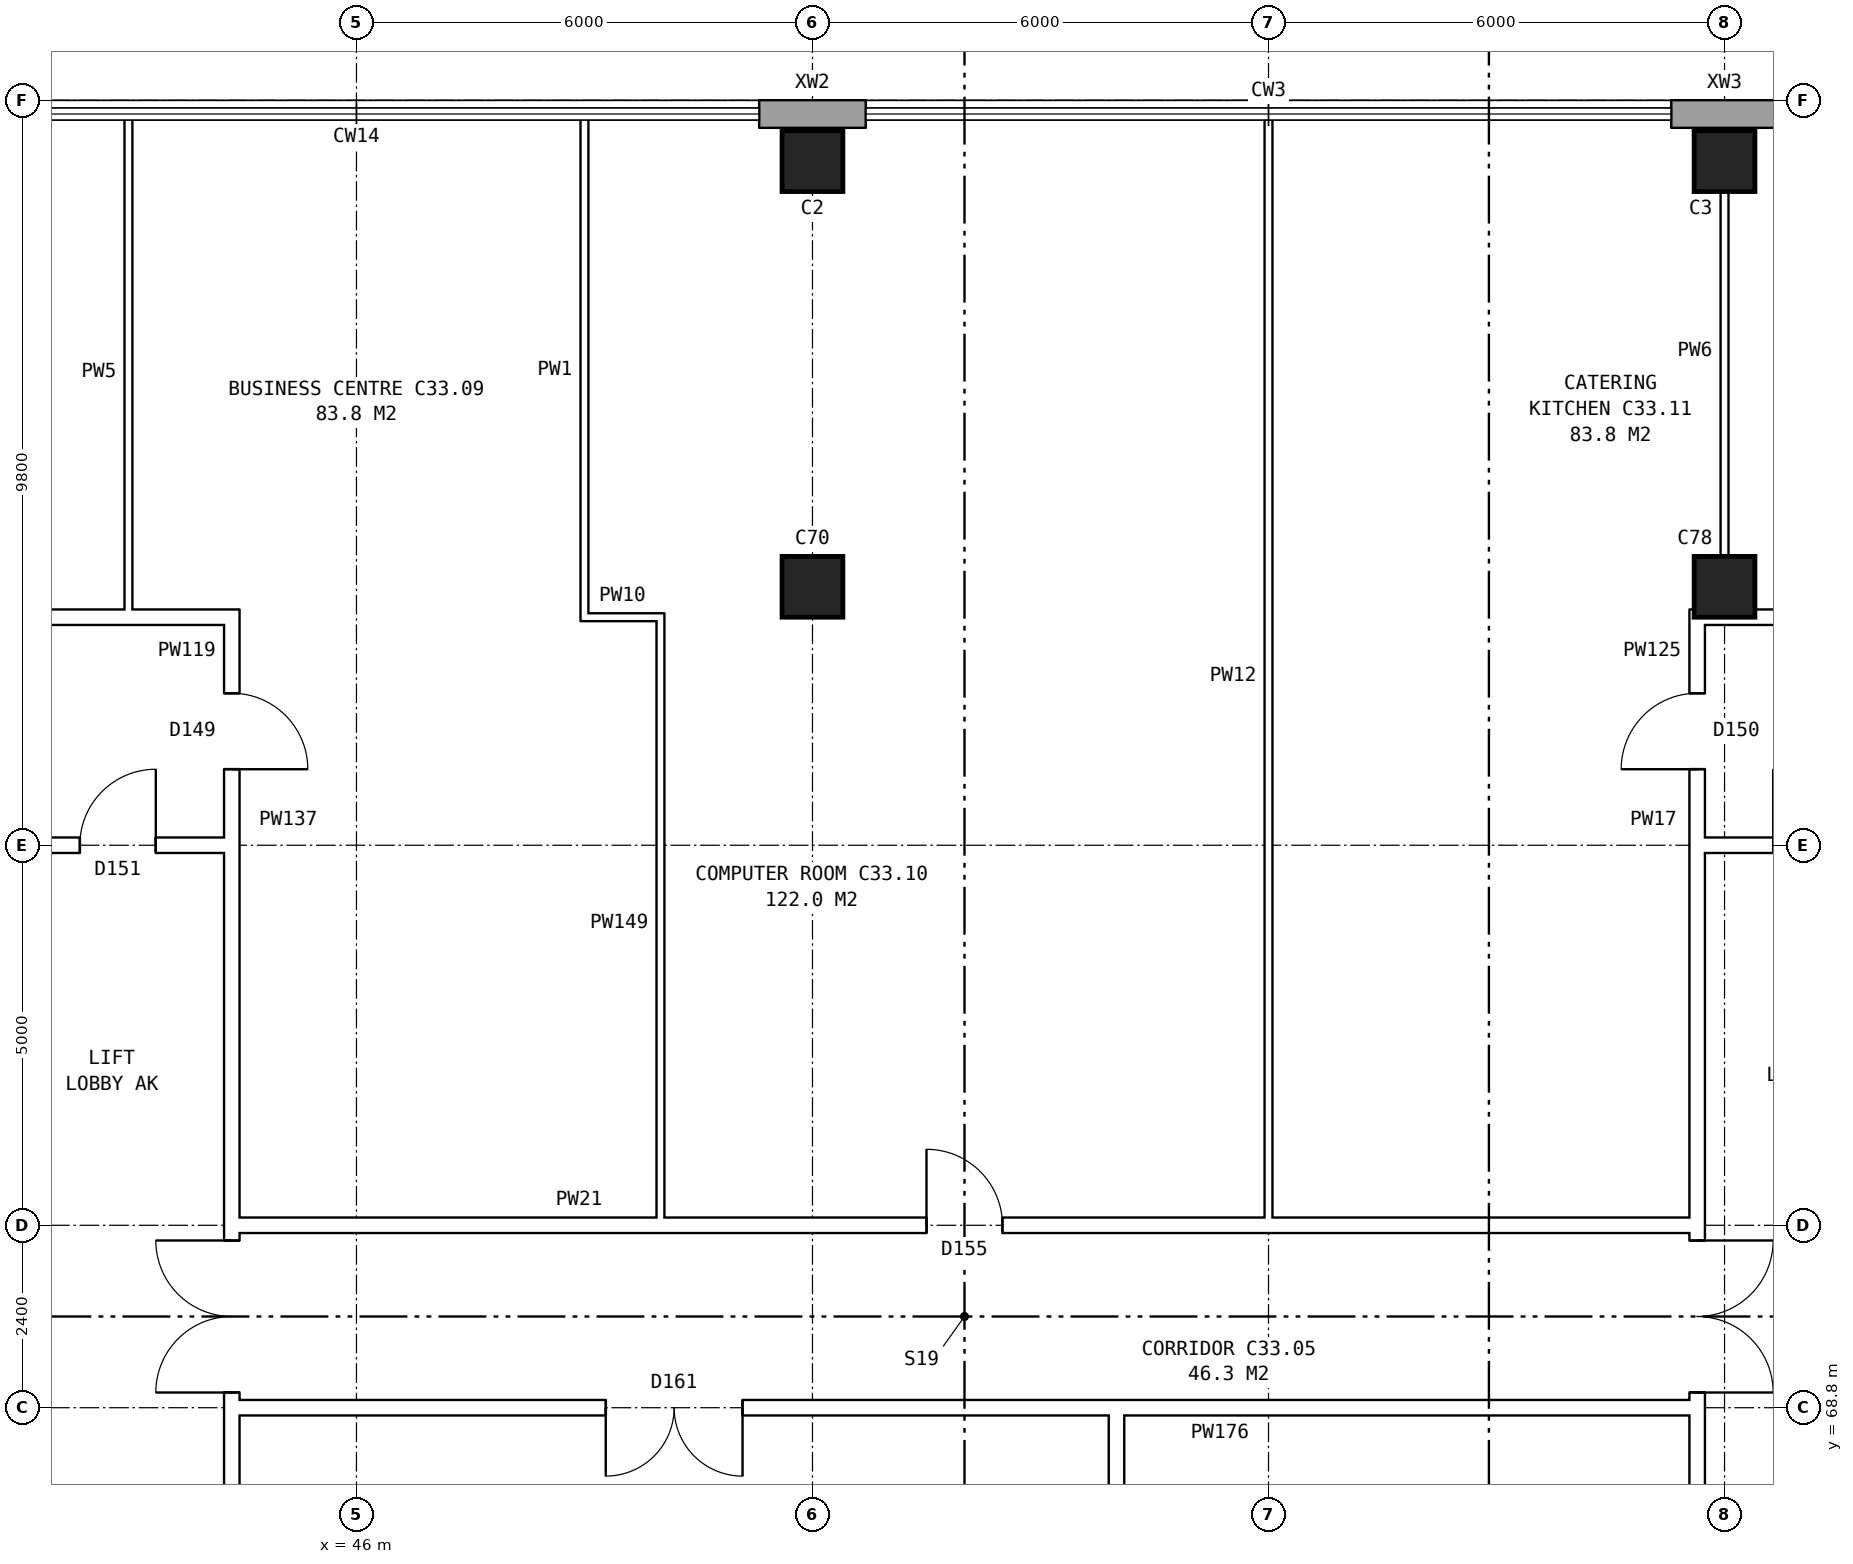
"""IFC4 building model, lengths in metres.
Left out: names, types, materials, properties, quantities, classifications, styles, units other than length and angle.
Written with IfcOpenShell. Run it as: python <this file> out.ifc"""

import sys

from ifc_helpers import new_model, si_unit, direction, frame, frame_2d, origin, origin_2d, place, context, subcontext, project, spatial, rectangle, extrude, element, fill, save


model = new_model("IFC4")
c1 = context("Model", 3, precision=1e-05, world=origin(), true_north=direction((0.0, 1.0)))
c2 = subcontext(c1, "Body", "Model", "MODEL_VIEW")
j1 = project(units=[si_unit("LENGTHUNIT", "METRE"), si_unit("PLANEANGLEUNIT", "RADIAN")], contexts=[c1])
p1 = place(None, origin())
s1 = spatial("IfcSite", under=j1, at=p1, CompositionType="ELEMENT")
p2 = place(p1, origin())
s2 = spatial("IfcBuilding", under=s1, at=p2, CompositionType="ELEMENT")
p3 = place(p2, frame((0.0, 0.0, 119.5)))
s3 = spatial("IfcBuildingStorey", under=s2, at=p3, CompositionType="ELEMENT", Elevation=119.5)
for number, where, z_axis, x_axis in (
    (1, (52.0, 79.6, 0.0), (0.0, 0.0, 1.0), (1.0, 0.0, 0.0)),
    (2, (52.0, 85.2, 0.0), (0.0, 0.0, 1.0), (1.0, 0.0, 0.0)),
    (3, (64.0, 79.6, 0.0), (0.0, 0.0, 1.0), (1.0, 0.0, 0.0)),
    (4, (64.0, 85.2, 0.0), (0.0, 0.0, 1.0), (1.0, 0.0, 0.0)),
):
    element("IfcColumn", number, at=place(p3, frame(where, z_axis=z_axis, x_axis=x_axis)), inside=s3, PredefinedType="COLUMN", context=c2, shape_type="SweptSolid", body=[
        extrude(rectangle(XDim=0.8, YDim=0.8, at=origin_2d()), origin(), (0.0, 0.0, 1.0), 3.6),
    ])
for number, where, z_axis, x_axis in (
    (5, (64.7, 85.82, 0.0), (0.0, 0.0, 1.0), (-1.0, 0.0, 0.0)),
    (6, (52.7, 85.82, 0.0), (0.0, 0.0, 1.0), (-1.0, 0.0, 0.0)),
):
    element("IfcWall", number, at=place(p3, frame(where, z_axis=z_axis, x_axis=x_axis)), inside=s3, PredefinedType="STANDARD", context=c2, shape_type="SweptSolid", body=[
        extrude(rectangle(XDim=1.4, YDim=0.36, at=frame_2d((0.7, 0.0))), origin(), (0.0, 0.0, 1.0), 3.6),
    ])
p4 = place(p3, frame((63.64, 63.9, 0.0), z_axis=(0.0, 0.0, 1.0), x_axis=(0.0, 1.0, 0.0)))
e7 = element("IfcWall", 7, at=p4, inside=s3, PredefinedType="PARTITIONING", context=c2, shape_type="SweptSolid", body=[
    extrude(rectangle(XDim=12.2, YDim=0.2, at=frame_2d((6.1, 0.0))), origin(), (0.0, 0.0, 1.0), 3.6),
])
p5 = place(p4, frame((5.1, 0.0, 0.0)))
e8 = element("IfcOpeningElement", 8, at=p5, cuts=e7, PredefinedType="OPENING", context=c2, shape_type="SweptSolid", body=[
    extrude(rectangle(XDim=2.0, YDim=2.1, at=frame_2d((1.0, 1.05))), frame((0.0, 0.11, 0.0), z_axis=(0.0, -1.0, 0.0), x_axis=(1.0, 0.0, 0.0)), (0.0, 0.0, 1.0), 0.22),
])
p6 = place(p3, frame((44.36, 63.9, 0.0), z_axis=(0.0, 0.0, 1.0), x_axis=(0.0, 1.0, 0.0)))
e9 = element("IfcWall", 9, at=p6, inside=s3, PredefinedType="PARTITIONING", context=c2, shape_type="SweptSolid", body=[
    extrude(rectangle(XDim=12.2, YDim=0.2, at=frame_2d((6.1, 0.0))), origin(), (0.0, 0.0, 1.0), 3.6),
])
p7 = place(p6, frame((5.1, 0.0, 0.0)))
e10 = element("IfcOpeningElement", 10, at=p7, cuts=e9, PredefinedType="OPENING", context=c2, shape_type="SweptSolid", body=[
    extrude(rectangle(XDim=2.0, YDim=2.1, at=frame_2d((1.0, 1.05))), frame((0.0, 0.11, 0.0), z_axis=(0.0, -1.0, 0.0), x_axis=(1.0, 0.0, 0.0)), (0.0, 0.0, 1.0), 0.22),
])
p8 = place(p3, frame((44.36, 68.8, 0.0), z_axis=(0.0, 0.0, 1.0), x_axis=(1.0, 0.0, 0.0)))
e11 = element("IfcWall", 11, at=p8, inside=s3, PredefinedType="PARTITIONING", context=c2, shape_type="SweptSolid", body=[
    extrude(rectangle(XDim=19.28, YDim=0.2, at=frame_2d((9.64, 0.0))), origin(), (0.0, 0.0, 1.0), 3.6),
])
p9 = place(p8, frame((4.92, 0.0, 0.0)))
e12 = element("IfcOpeningElement", 12, at=p9, cuts=e11, PredefinedType="OPENING", context=c2, shape_type="SweptSolid", body=[
    extrude(rectangle(XDim=1.8, YDim=2.1, at=frame_2d((0.9, 1.05))), frame((0.0, 0.11, 0.0), z_axis=(0.0, -1.0, 0.0), x_axis=(1.0, 0.0, 0.0)), (0.0, 0.0, 1.0), 0.22),
])
p10 = place(p3, frame((44.36, 71.2, 0.0), z_axis=(0.0, 0.0, 1.0), x_axis=(1.0, 0.0, 0.0)))
e13 = element("IfcWall", 13, at=p10, inside=s3, PredefinedType="PARTITIONING", context=c2, shape_type="SweptSolid", body=[
    extrude(rectangle(XDim=19.28, YDim=0.2, at=frame_2d((9.64, 0.0))), origin(), (0.0, 0.0, 1.0), 3.6),
])
p11 = place(p10, frame((9.14, 0.0, 0.0)))
e14 = element("IfcOpeningElement", 14, at=p11, cuts=e13, PredefinedType="OPENING", context=c2, shape_type="SweptSolid", body=[
    extrude(rectangle(XDim=1.0, YDim=2.1, at=frame_2d((0.5, 1.05))), frame((0.0, 0.11, 0.0), z_axis=(0.0, -1.0, 0.0), x_axis=(1.0, 0.0, 0.0)), (0.0, 0.0, 1.0), 0.22),
])
p12 = place(p3, frame((41.36, 76.2, 0.0), z_axis=(0.0, 0.0, 1.0), x_axis=(1.0, 0.0, 0.0)))
e15 = element("IfcWall", 15, at=p12, inside=s3, PredefinedType="PARTITIONING", context=c2, shape_type="SweptSolid", body=[
    extrude(rectangle(XDim=3.1, YDim=0.2, at=frame_2d((1.55, 0.0))), origin(), (0.0, 0.0, 1.0), 3.6),
])
p13 = place(p12, frame((1.0, 0.0, 0.0)))
e16 = element("IfcOpeningElement", 16, at=p13, cuts=e15, PredefinedType="OPENING", context=c2, shape_type="SweptSolid", body=[
    extrude(rectangle(XDim=1.0, YDim=2.1, at=frame_2d((0.5, 1.05))), frame((0.0, 0.11, 0.0), z_axis=(0.0, -1.0, 0.0), x_axis=(1.0, 0.0, 0.0)), (0.0, 0.0, 1.0), 0.22),
])
p14 = place(p3, frame((63.54, 76.2, 0.0), z_axis=(0.0, 0.0, 1.0), x_axis=(1.0, 0.0, 0.0)))
e17 = element("IfcWall", 17, at=p14, inside=s3, PredefinedType="PARTITIONING", context=c2, shape_type="SweptSolid", body=[
    extrude(rectangle(XDim=3.1, YDim=0.2, at=frame_2d((1.55, 0.0))), origin(), (0.0, 0.0, 1.0), 3.6),
])
p15 = place(p14, frame((1.1, 0.0, 0.0)))
e18 = element("IfcOpeningElement", 18, at=p15, cuts=e17, PredefinedType="OPENING", context=c2, shape_type="SweptSolid", body=[
    extrude(rectangle(XDim=1.0, YDim=2.1, at=frame_2d((0.5, 1.05))), frame((0.0, 0.11, 0.0), z_axis=(0.0, -1.0, 0.0), x_axis=(1.0, 0.0, 0.0)), (0.0, 0.0, 1.0), 0.22),
])
p16 = place(p3, frame((26.99, 79.2, 0.0), z_axis=(0.0, 0.0, 1.0), x_axis=(1.0, 0.0, 0.0)))
e19 = element("IfcWall", 19, at=p16, inside=s3, PredefinedType="PARTITIONING", context=c2, shape_type="SweptSolid", body=[
    extrude(rectangle(XDim=17.47, YDim=0.2, at=frame_2d((8.735, 0.0))), origin(), (0.0, 0.0, 1.0), 3.6),
])
p17 = place(p16, frame((1.615, 0.0, 0.0)))
e20 = element("IfcOpeningElement", 20, at=p17, cuts=e19, PredefinedType="OPENING", context=c2, shape_type="SweptSolid", body=[
    extrude(rectangle(XDim=0.9, YDim=2.1, at=frame_2d((0.45, 1.05))), frame((0.0, 0.11, 0.0), z_axis=(0.0, -1.0, 0.0), x_axis=(1.0, 0.0, 0.0)), (0.0, 0.0, 1.0), 0.22),
])
p18 = place(p16, frame((5.06, 0.0, 0.0)))
e21 = element("IfcOpeningElement", 21, at=p18, cuts=e19, PredefinedType="OPENING", context=c2, shape_type="SweptSolid", body=[
    extrude(rectangle(XDim=0.9, YDim=2.1, at=frame_2d((0.45, 1.05))), frame((0.0, 0.11, 0.0), z_axis=(0.0, -1.0, 0.0), x_axis=(1.0, 0.0, 0.0)), (0.0, 0.0, 1.0), 0.22),
])
p19 = place(p16, frame((8.06, 0.0, 0.0)))
e22 = element("IfcOpeningElement", 22, at=p19, cuts=e19, PredefinedType="OPENING", context=c2, shape_type="SweptSolid", body=[
    extrude(rectangle(XDim=0.9, YDim=2.1, at=frame_2d((0.45, 1.05))), frame((0.0, 0.11, 0.0), z_axis=(0.0, -1.0, 0.0), x_axis=(1.0, 0.0, 0.0)), (0.0, 0.0, 1.0), 0.22),
])
p20 = place(p16, frame((13.71, 0.0, 0.0)))
e23 = element("IfcOpeningElement", 23, at=p20, cuts=e19, PredefinedType="OPENING", context=c2, shape_type="SweptSolid", body=[
    extrude(rectangle(XDim=1.0, YDim=2.1, at=frame_2d((0.5, 1.05))), frame((0.0, 0.11, 0.0), z_axis=(0.0, -1.0, 0.0), x_axis=(1.0, 0.0, 0.0)), (0.0, 0.0, 1.0), 0.22),
])
p21 = place(p3, frame((63.54, 79.2, 0.0), z_axis=(0.0, 0.0, 1.0), x_axis=(1.0, 0.0, 0.0)))
e24 = element("IfcWall", 24, at=p21, inside=s3, PredefinedType="PARTITIONING", context=c2, shape_type="SweptSolid", body=[
    extrude(rectangle(XDim=12.22, YDim=0.2, at=frame_2d((6.11, 0.0))), origin(), (0.0, 0.0, 1.0), 3.6),
])
p22 = place(p21, frame((1.46, 0.0, 0.0)))
e25 = element("IfcOpeningElement", 25, at=p22, cuts=e24, PredefinedType="OPENING", context=c2, shape_type="SweptSolid", body=[
    extrude(rectangle(XDim=1.0, YDim=2.1, at=frame_2d((0.5, 1.05))), frame((0.0, 0.11, 0.0), z_axis=(0.0, -1.0, 0.0), x_axis=(1.0, 0.0, 0.0)), (0.0, 0.0, 1.0), 0.22),
])
p23 = place(p21, frame((5.96, 0.0, 0.0)))
e26 = element("IfcOpeningElement", 26, at=p23, cuts=e24, PredefinedType="OPENING", context=c2, shape_type="SweptSolid", body=[
    extrude(rectangle(XDim=1.0, YDim=2.1, at=frame_2d((0.5, 1.05))), frame((0.0, 0.11, 0.0), z_axis=(0.0, -1.0, 0.0), x_axis=(1.0, 0.0, 0.0)), (0.0, 0.0, 1.0), 0.22),
])
p24 = place(p21, frame((10.28, 0.0, 0.0)))
e27 = element("IfcOpeningElement", 27, at=p24, cuts=e24, PredefinedType="OPENING", context=c2, shape_type="SweptSolid", body=[
    extrude(rectangle(XDim=1.0, YDim=2.1, at=frame_2d((0.5, 1.05))), frame((0.0, 0.11, 0.0), z_axis=(0.0, -1.0, 0.0), x_axis=(1.0, 0.0, 0.0)), (0.0, 0.0, 1.0), 0.22),
])
p25 = place(p3, frame((48.95, 79.2, 0.0), z_axis=(0.0, 0.0, 1.0), x_axis=(1.0, 0.0, 0.0)))
e28 = element("IfcWall", 28, at=p25, inside=s3, PredefinedType="PARTITIONING", context=c2, shape_type="SweptSolid", body=[
    extrude(rectangle(XDim=1.1, YDim=0.1, at=frame_2d((0.55, 0.0))), origin(), (0.0, 0.0, 1.0), 3.6),
])
p26 = place(p3, frame((43.0, 79.1, 0.0), z_axis=(0.0, 0.0, 1.0), x_axis=(0.0, 1.0, 0.0)))
e29 = element("IfcWall", 29, at=p26, inside=s3, PredefinedType="PARTITIONING", context=c2, shape_type="SweptSolid", body=[
    extrude(rectangle(XDim=6.66, YDim=0.1, at=frame_2d((3.33, 0.0))), origin(), (0.0, 0.0, 1.0), 3.6),
])
p27 = place(p3, frame((44.36, 76.1, 0.0), z_axis=(0.0, 0.0, 1.0), x_axis=(0.0, 1.0, 0.0)))
e30 = element("IfcWall", 30, at=p27, inside=s3, PredefinedType="PARTITIONING", context=c2, shape_type="SweptSolid", body=[
    extrude(rectangle(XDim=3.2, YDim=0.2, at=frame_2d((1.6, 0.0))), origin(), (0.0, 0.0, 1.0), 3.6),
])
p28 = place(p27, frame((1.1, 0.0, 0.0)))
e31 = element("IfcOpeningElement", 31, at=p28, cuts=e30, PredefinedType="OPENING", context=c2, shape_type="SweptSolid", body=[
    extrude(rectangle(XDim=1.0, YDim=2.1, at=frame_2d((0.5, 1.05))), frame((0.0, 0.11, 0.0), z_axis=(0.0, -1.0, 0.0), x_axis=(1.0, 0.0, 0.0)), (0.0, 0.0, 1.0), 0.22),
])
p29 = place(p3, frame((49.0, 79.15, 0.0), z_axis=(0.0, 0.0, 1.0), x_axis=(0.0, 1.0, 0.0)))
e32 = element("IfcWall", 32, at=p29, inside=s3, PredefinedType="PARTITIONING", context=c2, shape_type="SweptSolid", body=[
    extrude(rectangle(XDim=6.61, YDim=0.1, at=frame_2d((3.305, 0.0))), origin(), (0.0, 0.0, 1.0), 3.6),
])
p30 = place(p3, frame((50.0, 71.1, 0.0), z_axis=(0.0, 0.0, 1.0), x_axis=(0.0, 1.0, 0.0)))
e33 = element("IfcWall", 33, at=p30, inside=s3, PredefinedType="PARTITIONING", context=c2, shape_type="SweptSolid", body=[
    extrude(rectangle(XDim=8.15, YDim=0.1, at=frame_2d((4.075, 0.0))), origin(), (0.0, 0.0, 1.0), 3.6),
])
p31 = place(p3, frame((56.0, 60.7, 0.0), z_axis=(0.0, 0.0, 1.0), x_axis=(0.0, 1.0, 0.0)))
e34 = element("IfcWall", 34, at=p31, inside=s3, PredefinedType="PARTITIONING", context=c2, shape_type="SweptSolid", body=[
    extrude(rectangle(XDim=8.2, YDim=0.2, at=frame_2d((4.1, 0.0))), origin(), (0.0, 0.0, 1.0), 3.6),
])
p32 = place(p3, frame((58.0, 71.1, 0.0), z_axis=(0.0, 0.0, 1.0), x_axis=(0.0, 1.0, 0.0)))
e35 = element("IfcWall", 35, at=p32, inside=s3, PredefinedType="PARTITIONING", context=c2, shape_type="SweptSolid", body=[
    extrude(rectangle(XDim=14.66, YDim=0.1, at=frame_2d((7.33, 0.0))), origin(), (0.0, 0.0, 1.0), 3.6),
])
p33 = place(p3, frame((63.64, 76.1, 0.0), z_axis=(0.0, 0.0, 1.0), x_axis=(0.0, 1.0, 0.0)))
e36 = element("IfcWall", 36, at=p33, inside=s3, PredefinedType="PARTITIONING", context=c2, shape_type="SweptSolid", body=[
    extrude(rectangle(XDim=3.2, YDim=0.2, at=frame_2d((1.6, 0.0))), origin(), (0.0, 0.0, 1.0), 3.6),
])
p34 = place(p33, frame((1.1, 0.0, 0.0)))
e37 = element("IfcOpeningElement", 37, at=p34, cuts=e36, PredefinedType="OPENING", context=c2, shape_type="SweptSolid", body=[
    extrude(rectangle(XDim=1.0, YDim=2.1, at=frame_2d((0.5, 1.05))), frame((0.0, 0.11, 0.0), z_axis=(0.0, -1.0, 0.0), x_axis=(1.0, 0.0, 0.0)), (0.0, 0.0, 1.0), 0.22),
])
p35 = place(p3, frame((64.0, 79.1, 0.0), z_axis=(0.0, 0.0, 1.0), x_axis=(0.0, 1.0, 0.0)))
e38 = element("IfcWall", 38, at=p35, inside=s3, PredefinedType="PARTITIONING", context=c2, shape_type="SweptSolid", body=[
    extrude(rectangle(XDim=6.66, YDim=0.1, at=frame_2d((3.33, 0.0))), origin(), (0.0, 0.0, 1.0), 3.6),
])
p36 = place(p5, frame((2.0, 0.0, 0.0), z_axis=(0.0, 0.0, 1.0), x_axis=(-1.0, 0.0, 0.0)))
e39 = element("IfcDoor", 39, at=p36, inside=s3, OperationType="DOUBLE_DOOR_SINGLE_SWING", PredefinedType="DOOR", context=c2, shape_type="SweptSolid", body=[
    extrude(rectangle(XDim=2.0, YDim=2.1, at=frame_2d((1.0, 1.05))), frame((0.0, 0.025, 0.0), z_axis=(0.0, -1.0, 0.0), x_axis=(1.0, 0.0, 0.0)), (0.0, 0.0, 1.0), 0.05),
])
fill(e8, e39)
p37 = place(p7, origin())
e40 = element("IfcDoor", 40, at=p37, inside=s3, OperationType="DOUBLE_DOOR_SINGLE_SWING", PredefinedType="DOOR", context=c2, shape_type="SweptSolid", body=[
    extrude(rectangle(XDim=2.0, YDim=2.1, at=frame_2d((1.0, 1.05))), frame((0.0, 0.025, 0.0), z_axis=(0.0, -1.0, 0.0), x_axis=(1.0, 0.0, 0.0)), (0.0, 0.0, 1.0), 0.05),
])
fill(e10, e40)
p38 = place(p9, frame((1.8, 0.0, 0.0), z_axis=(0.0, 0.0, 1.0), x_axis=(-1.0, 0.0, 0.0)))
e41 = element("IfcDoor", 41, at=p38, inside=s3, OperationType="DOUBLE_DOOR_SINGLE_SWING", PredefinedType="DOOR", context=c2, shape_type="SweptSolid", body=[
    extrude(rectangle(XDim=1.8, YDim=2.1, at=frame_2d((0.9, 1.05))), frame((0.0, 0.025, 0.0), z_axis=(0.0, -1.0, 0.0), x_axis=(1.0, 0.0, 0.0)), (0.0, 0.0, 1.0), 0.05),
])
fill(e12, e41)
p39 = place(p11, origin())
e42 = element("IfcDoor", 42, at=p39, inside=s3, OperationType="SINGLE_SWING_LEFT", PredefinedType="DOOR", context=c2, shape_type="SweptSolid", body=[
    extrude(rectangle(XDim=1.0, YDim=2.1, at=frame_2d((0.5, 1.05))), frame((0.0, 0.025, 0.0), z_axis=(0.0, -1.0, 0.0), x_axis=(1.0, 0.0, 0.0)), (0.0, 0.0, 1.0), 0.05),
])
fill(e14, e42)
p40 = place(p13, origin())
e43 = element("IfcDoor", 43, at=p40, inside=s3, OperationType="SINGLE_SWING_RIGHT", PredefinedType="DOOR", context=c2, shape_type="SweptSolid", body=[
    extrude(rectangle(XDim=1.0, YDim=2.1, at=frame_2d((0.5, 1.05))), frame((0.0, 0.025, 0.0), z_axis=(0.0, -1.0, 0.0), x_axis=(1.0, 0.0, 0.0)), (0.0, 0.0, 1.0), 0.05),
])
fill(e16, e43)
p41 = place(p28, frame((1.0, 0.0, 0.0), z_axis=(0.0, 0.0, 1.0), x_axis=(-1.0, 0.0, 0.0)))
e44 = element("IfcDoor", 44, at=p41, inside=s3, OperationType="SINGLE_SWING_RIGHT", PredefinedType="DOOR", context=c2, shape_type="SweptSolid", body=[
    extrude(rectangle(XDim=1.0, YDim=2.1, at=frame_2d((0.5, 1.05))), frame((0.0, 0.025, 0.0), z_axis=(0.0, -1.0, 0.0), x_axis=(1.0, 0.0, 0.0)), (0.0, 0.0, 1.0), 0.05),
])
fill(e31, e44)
p42 = place(p34, origin())
e45 = element("IfcDoor", 45, at=p42, inside=s3, OperationType="SINGLE_SWING_LEFT", PredefinedType="DOOR", context=c2, shape_type="SweptSolid", body=[
    extrude(rectangle(XDim=1.0, YDim=2.1, at=frame_2d((0.5, 1.05))), frame((0.0, 0.025, 0.0), z_axis=(0.0, -1.0, 0.0), x_axis=(1.0, 0.0, 0.0)), (0.0, 0.0, 1.0), 0.05),
])
fill(e37, e45)
save(model, sys.argv[1])
